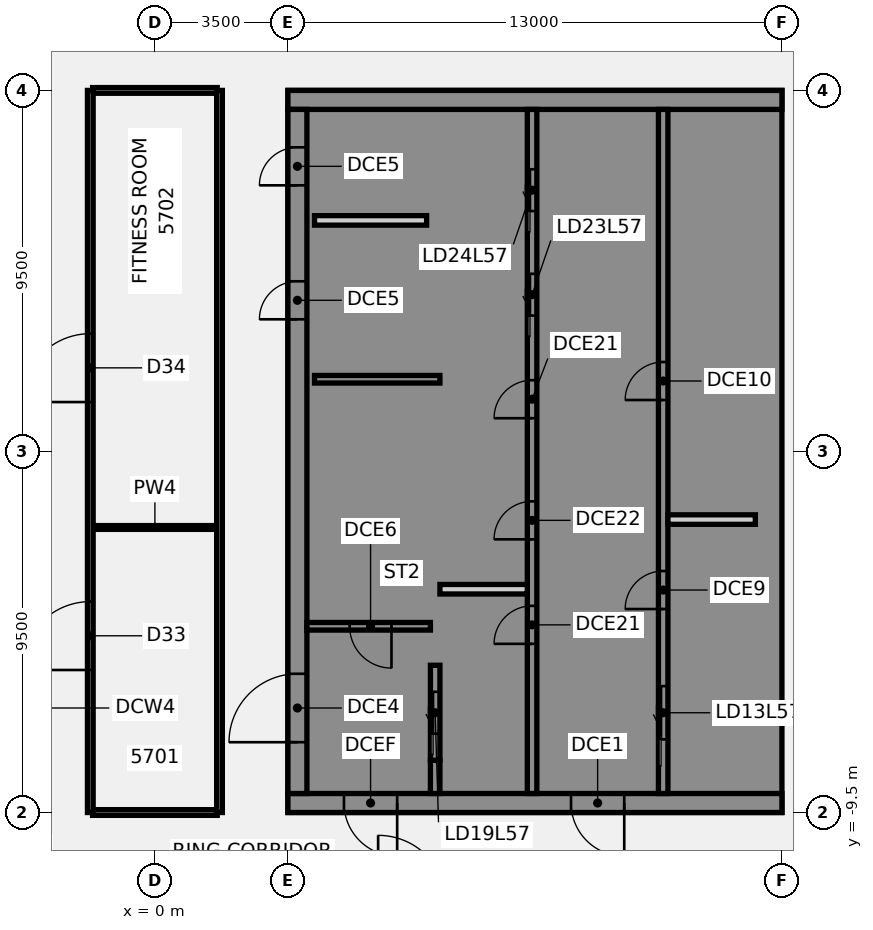
"""IFC4 building model, lengths in metres.
Left out: names, types, materials, properties, quantities, classifications, styles, units other than length and angle.
Written with IfcOpenShell. Run it as: python <this file> out.ifc"""

import sys

from ifc_helpers import new_model, si_unit, direction, frame, frame_2d, origin, place, context, subcontext, project, spatial, polyline, rectangle, outline, extrude, element, fill, save


model = new_model("IFC4")
c1 = context("Model", 3, precision=1e-05, world=origin(), true_north=direction((0.0, 1.0)))
c2 = subcontext(c1, "Body", "Model", "MODEL_VIEW")
j1 = project(units=[si_unit("LENGTHUNIT", "METRE"), si_unit("PLANEANGLEUNIT", "RADIAN")], contexts=[c1])
p1 = place(None, origin())
s1 = spatial("IfcSite", under=j1, at=p1, CompositionType="ELEMENT")
p2 = place(p1, origin())
s2 = spatial("IfcBuilding", under=s1, at=p2, CompositionType="ELEMENT")
p3 = place(p2, frame((0.0, 0.0, 227.1)))
s3 = spatial("IfcBuildingStorey", under=s2, at=p3, CompositionType="ELEMENT", Elevation=227.1)
p4 = place(p3, frame((-1.64, -9.5, 0.0), z_axis=(0.0, 0.0, 1.0), x_axis=(1.0, 0.0, 0.0)))
e1 = element("IfcWall", 1, at=p4, inside=s3, PredefinedType="PARTITIONING", context=c2, shape_type="SweptSolid", body=[
    extrude(rectangle(XDim=3.28, YDim=0.15, at=frame_2d((1.64, 0.0))), origin(), (0.0, 0.0, 1.0), 2.864),
])
p5 = place(p3, frame((-1.64, -2.0, 0.0), z_axis=(0.0, 0.0, 1.0), x_axis=(1.0, 0.0, 0.0)))
e2 = element("IfcWall", 2, at=p5, inside=s3, PredefinedType="PARTITIONING", context=c2, shape_type="SweptSolid", body=[
    extrude(rectangle(XDim=3.28, YDim=0.1, at=frame_2d((1.64, 0.0))), origin(), (0.0, 0.0, 1.0), 2.864),
])
p6 = place(p3, frame((-1.64, 9.5, 0.0), z_axis=(0.0, 0.0, 1.0), x_axis=(1.0, 0.0, 0.0)))
e3 = element("IfcWall", 3, at=p6, inside=s3, PredefinedType="PARTITIONING", context=c2, shape_type="SweptSolid", body=[
    extrude(rectangle(XDim=3.28, YDim=0.15, at=frame_2d((1.64, 0.0))), origin(), (0.0, 0.0, 1.0), 2.864),
])
p7 = place(p3, frame((-1.7, -9.5, 0.0), z_axis=(0.0, 0.0, 1.0), x_axis=(0.0, 1.0, 0.0)))
e4 = element("IfcWall", 4, at=p7, inside=s3, PredefinedType="PARTITIONING", context=c2, shape_type="SweptSolid", body=[
    extrude(rectangle(XDim=19.0, YDim=0.15, at=frame_2d((9.5, 0.0))), origin(), (0.0, 0.0, 1.0), 2.864),
])
p8 = place(p7, frame((3.75, 0.0, 0.0)))
e5 = element("IfcOpeningElement", 5, at=p8, cuts=e4, PredefinedType="OPENING", context=c2, shape_type="SweptSolid", body=[
    extrude(rectangle(XDim=1.8, YDim=2.1, at=frame_2d((0.9, 1.05))), frame((0.0, 0.085, 0.0), z_axis=(0.0, -1.0, 0.0), x_axis=(1.0, 0.0, 0.0)), (0.0, 0.0, 1.0), 0.17),
])
p9 = place(p7, frame((10.8, 0.0, 0.0)))
e6 = element("IfcOpeningElement", 6, at=p9, cuts=e4, PredefinedType="OPENING", context=c2, shape_type="SweptSolid", body=[
    extrude(rectangle(XDim=1.8, YDim=2.1, at=frame_2d((0.9, 1.05))), frame((0.0, 0.085, 0.0), z_axis=(0.0, -1.0, 0.0), x_axis=(1.0, 0.0, 0.0)), (0.0, 0.0, 1.0), 0.17),
])
p10 = place(p3, frame((1.7, -9.5, 0.0), z_axis=(0.0, 0.0, 1.0), x_axis=(0.0, 1.0, 0.0)))
e7 = element("IfcWall", 7, at=p10, inside=s3, PredefinedType="PARTITIONING", context=c2, shape_type="SweptSolid", body=[
    extrude(rectangle(XDim=19.0, YDim=0.15, at=frame_2d((9.5, 0.0))), origin(), (0.0, 0.0, 1.0), 2.864),
])
p11 = place(p3, frame((16.5, -9.25, 0.0), z_axis=(0.0, 0.0, 1.0), x_axis=(-1.0, 0.0, 0.0)))
e8 = element("IfcWall", 8, at=p11, inside=s3, PredefinedType="SHEAR", context=c2, shape_type="SweptSolid", body=[
    extrude(rectangle(XDim=13.0, YDim=0.5, at=frame_2d((6.5, 0.0))), origin(), (0.0, 0.0, 1.0), 3.46),
])
p12 = place(p11, frame((4.15, 0.0, 0.0)))
e9 = element("IfcOpeningElement", 9, at=p12, cuts=e8, PredefinedType="OPENING", context=c2, shape_type="SweptSolid", body=[
    extrude(rectangle(XDim=1.4, YDim=2.1, at=frame_2d((0.7, 1.05))), frame((0.0, 0.26, 0.0), z_axis=(0.0, -1.0, 0.0), x_axis=(1.0, 0.0, 0.0)), (0.0, 0.0, 1.0), 0.52),
])
p13 = place(p11, frame((10.125, 0.0, 0.0)))
e10 = element("IfcOpeningElement", 10, at=p13, cuts=e8, PredefinedType="OPENING", context=c2, shape_type="SweptSolid", body=[
    extrude(rectangle(XDim=1.4, YDim=2.1, at=frame_2d((0.7, 1.05))), frame((0.0, 0.26, 0.0), z_axis=(0.0, -1.0, 0.0), x_axis=(1.0, 0.0, 0.0)), (0.0, 0.0, 1.0), 0.52),
])
p14 = place(p3, origin())
e11 = element("IfcWall", 11, at=p14, inside=s3, PredefinedType="SHEAR", context=c2, shape_type="SweptSolid", body=[
    extrude(outline(polyline([(13.5, -8.125), (13.5, -9.0), (16.0, -9.0), (16.5, -9.0), (16.5, 9.0), (16.0, 9.0), (13.5, 9.0), (13.5, 8.125), (16.0, 8.125), (16.0, 5.625), (13.5, 5.625), (13.5, 5.375), (16.0, 5.375), (16.0, -5.375), (13.5, -5.375), (13.5, -5.625), (16.0, -5.625), (16.0, -8.125), (13.5, -8.125)])), origin(), (0.0, 0.0, 1.0), 3.46),
])
p15 = place(p3, frame((16.5, 9.25, 0.0), z_axis=(0.0, 0.0, 1.0), x_axis=(-1.0, 0.0, 0.0)))
e12 = element("IfcWall", 12, at=p15, inside=s3, PredefinedType="SHEAR", context=c2, shape_type="SweptSolid", body=[
    extrude(rectangle(XDim=13.0, YDim=0.5, at=frame_2d((6.5, 0.0))), origin(), (0.0, 0.0, 1.0), 3.46),
])
p16 = place(p3, origin())
e13 = element("IfcWall", 13, at=p16, inside=s3, PredefinedType="SHEAR", context=c2, shape_type="SweptSolid", body=[
    extrude(outline(polyline([(9.8, -5.375), (7.5, -5.375), (7.5, 2.625), (9.8, 2.625), (9.8, 2.875), (7.5, 2.875), (7.5, 5.375), (9.8, 5.375), (9.8, 5.625), (7.5, 5.625), (7.5, 8.125), (9.8, 8.125), (9.8, 9.0), (7.5, 9.0), (7.25, 9.0), (7.25, -5.625), (7.5, -5.625), (9.8, -5.625), (9.8, -5.375)])), origin(), (0.0, 0.0, 1.0), 3.46),
])
p17 = place(p3, origin())
e14 = element("IfcWall", 14, at=p17, inside=s3, PredefinedType="SHEAR", context=c2, shape_type="SweptSolid", body=[
    extrude(outline(polyline([(7.5, -8.125), (7.5, -9.0), (9.8, -9.0), (9.8, -8.125), (9.8, -5.625), (9.55, -5.625), (9.55, -8.125), (7.5, -8.125)])), origin(), (0.0, 0.0, 1.0), 3.46),
])
p18 = place(p3, frame((7.375, -9.0, 0.0), z_axis=(0.0, 0.0, 1.0), x_axis=(0.0, 1.0, 0.0)))
e15 = element("IfcWall", 15, at=p18, inside=s3, PredefinedType="SHEAR", context=c2, shape_type="SweptSolid", body=[
    extrude(rectangle(XDim=0.875, YDim=0.25, at=frame_2d((0.438, 0.0))), origin(), (0.0, 0.0, 1.0), 3.46),
])
p19 = place(p3, frame((7.5, 1.9, 0.0), z_axis=(0.0, 0.0, 1.0), x_axis=(-1.0, 0.0, 0.0)))
e16 = element("IfcWall", 16, at=p19, inside=s3, PredefinedType="SHEAR", context=c2, shape_type="SweptSolid", body=[
    extrude(rectangle(XDim=3.3, YDim=0.2, at=frame_2d((1.65, 0.0))), origin(), (0.0, 0.0, 1.0), 3.46),
])
p20 = place(p3, frame((13.375, -9.0, 0.0), z_axis=(0.0, 0.0, 1.0), x_axis=(0.0, 1.0, 0.0)))
e17 = element("IfcWall", 17, at=p20, inside=s3, PredefinedType="SHEAR", context=c2, shape_type="SweptSolid", body=[
    extrude(rectangle(XDim=18.0, YDim=0.25, at=frame_2d((9.0, 0.0))), origin(), (0.0, 0.0, 1.0), 3.46),
])
p21 = place(p20, frame((1.425, 0.0, 0.0)))
e18 = element("IfcOpeningElement", 18, at=p21, cuts=e17, PredefinedType="OPENING", context=c2, shape_type="SweptSolid", body=[
    extrude(rectangle(XDim=1.4, YDim=2.1, at=frame_2d((0.7, 1.05))), frame((0.0, 0.135, 0.0), z_axis=(0.0, -1.0, 0.0), x_axis=(1.0, 0.0, 0.0)), (0.0, 0.0, 1.0), 0.27),
])
p22 = place(p20, frame((4.854, 0.0, 0.0)))
e19 = element("IfcOpeningElement", 19, at=p22, cuts=e17, PredefinedType="OPENING", context=c2, shape_type="SweptSolid", body=[
    extrude(rectangle(XDim=1.0, YDim=2.1, at=frame_2d((0.5, 1.05))), frame((0.0, 0.135, 0.0), z_axis=(0.0, -1.0, 0.0), x_axis=(1.0, 0.0, 0.0)), (0.0, 0.0, 1.0), 0.27),
])
p23 = place(p20, frame((10.354, 0.0, 0.0)))
e20 = element("IfcOpeningElement", 20, at=p23, cuts=e17, PredefinedType="OPENING", context=c2, shape_type="SweptSolid", body=[
    extrude(rectangle(XDim=1.0, YDim=2.1, at=frame_2d((0.5, 1.05))), frame((0.0, 0.135, 0.0), z_axis=(0.0, -1.0, 0.0), x_axis=(1.0, 0.0, 0.0)), (0.0, 0.0, 1.0), 0.27),
])
p24 = place(p3, frame((9.925, -9.0, 0.0), z_axis=(0.0, 0.0, 1.0), x_axis=(0.0, 1.0, 0.0)))
e21 = element("IfcWall", 21, at=p24, inside=s3, PredefinedType="SHEAR", context=c2, shape_type="SweptSolid", body=[
    extrude(rectangle(XDim=18.0, YDim=0.25, at=frame_2d((9.0, 0.0))), origin(), (0.0, 0.0, 1.0), 3.46),
])
p25 = place(p24, frame((12.575, 0.0, 0.0)))
e22 = element("IfcOpeningElement", 22, at=p25, cuts=e21, PredefinedType="OPENING", context=c2, shape_type="SweptSolid", body=[
    extrude(rectangle(XDim=1.1, YDim=2.1, at=frame_2d((0.55, 1.05))), frame((0.0, 0.135, 0.0), z_axis=(0.0, -1.0, 0.0), x_axis=(1.0, 0.0, 0.0)), (0.0, 0.0, 1.0), 0.27),
])
p26 = place(p24, frame((15.325, 0.0, 0.0)))
e23 = element("IfcOpeningElement", 23, at=p26, cuts=e21, PredefinedType="OPENING", context=c2, shape_type="SweptSolid", body=[
    extrude(rectangle(XDim=1.1, YDim=2.1, at=frame_2d((0.55, 1.05))), frame((0.0, 0.135, 0.0), z_axis=(0.0, -1.0, 0.0), x_axis=(1.0, 0.0, 0.0)), (0.0, 0.0, 1.0), 0.27),
])
p27 = place(p24, frame((3.938, 0.0, 0.0)))
e24 = element("IfcOpeningElement", 24, at=p27, cuts=e21, PredefinedType="OPENING", context=c2, shape_type="SweptSolid", body=[
    extrude(rectangle(XDim=1.0, YDim=2.1, at=frame_2d((0.5, 1.05))), frame((0.0, 0.135, 0.0), z_axis=(0.0, -1.0, 0.0), x_axis=(1.0, 0.0, 0.0)), (0.0, 0.0, 1.0), 0.27),
])
p28 = place(p24, frame((6.688, 0.0, 0.0)))
e25 = element("IfcOpeningElement", 25, at=p28, cuts=e21, PredefinedType="OPENING", context=c2, shape_type="SweptSolid", body=[
    extrude(rectangle(XDim=1.0, YDim=2.1, at=frame_2d((0.5, 1.05))), frame((0.0, 0.135, 0.0), z_axis=(0.0, -1.0, 0.0), x_axis=(1.0, 0.0, 0.0)), (0.0, 0.0, 1.0), 0.27),
])
p29 = place(p24, frame((9.875, 0.0, 0.0)))
e26 = element("IfcOpeningElement", 26, at=p29, cuts=e21, PredefinedType="OPENING", context=c2, shape_type="SweptSolid", body=[
    extrude(rectangle(XDim=1.0, YDim=2.1, at=frame_2d((0.5, 1.05))), frame((0.0, 0.135, 0.0), z_axis=(0.0, -1.0, 0.0), x_axis=(1.0, 0.0, 0.0)), (0.0, 0.0, 1.0), 0.27),
])
p30 = place(p3, frame((7.375, -8.125, 0.0), z_axis=(0.0, 0.0, 1.0), x_axis=(0.0, 1.0, 0.0)))
e27 = element("IfcWall", 27, at=p30, inside=s3, PredefinedType="SHEAR", context=c2, shape_type="SweptSolid", body=[
    extrude(rectangle(XDim=2.5, YDim=0.25, at=frame_2d((1.25, 0.0))), origin(), (0.0, 0.0, 1.0), 3.46),
])
p31 = place(p30, frame((0.7, 0.0, 0.0)))
e28 = element("IfcOpeningElement", 28, at=p31, cuts=e27, PredefinedType="OPENING", context=c2, shape_type="SweptSolid", body=[
    extrude(rectangle(XDim=1.1, YDim=2.1, at=frame_2d((0.55, 1.05))), frame((0.0, 0.135, 0.0), z_axis=(0.0, -1.0, 0.0), x_axis=(1.0, 0.0, 0.0)), (0.0, 0.0, 1.0), 0.27),
])
p32 = place(p3, frame((3.75, -9.0, 0.0), z_axis=(0.0, 0.0, 1.0), x_axis=(0.0, 1.0, 0.0)))
e29 = element("IfcWall", 29, at=p32, inside=s3, PredefinedType="SHEAR", context=c2, shape_type="SweptSolid", body=[
    extrude(rectangle(XDim=18.0, YDim=0.5, at=frame_2d((9.0, 0.0))), origin(), (0.0, 0.0, 1.0), 3.46),
])
p33 = place(p32, frame((1.35, 0.0, 0.0)))
e30 = element("IfcOpeningElement", 30, at=p33, cuts=e29, PredefinedType="OPENING", context=c2, shape_type="SweptSolid", body=[
    extrude(rectangle(XDim=1.8, YDim=2.1, at=frame_2d((0.9, 1.05))), frame((0.0, 0.26, 0.0), z_axis=(0.0, -1.0, 0.0), x_axis=(1.0, 0.0, 0.0)), (0.0, 0.0, 1.0), 0.52),
])
p34 = place(p32, frame((12.478, 0.0, 0.0)))
e31 = element("IfcOpeningElement", 31, at=p34, cuts=e29, PredefinedType="OPENING", context=c2, shape_type="SweptSolid", body=[
    extrude(rectangle(XDim=1.0, YDim=2.1, at=frame_2d((0.5, 1.05))), frame((0.0, 0.26, 0.0), z_axis=(0.0, -1.0, 0.0), x_axis=(1.0, 0.0, 0.0)), (0.0, 0.0, 1.0), 0.52),
])
p35 = place(p32, frame((16.002, 0.0, 0.0)))
e32 = element("IfcOpeningElement", 32, at=p35, cuts=e29, PredefinedType="OPENING", context=c2, shape_type="SweptSolid", body=[
    extrude(rectangle(XDim=1.0, YDim=2.1, at=frame_2d((0.5, 1.05))), frame((0.0, 0.26, 0.0), z_axis=(0.0, -1.0, 0.0), x_axis=(1.0, 0.0, 0.0)), (0.0, 0.0, 1.0), 0.52),
])
p36 = place(p3, frame((7.15, 6.08, 0.0), z_axis=(0.0, 0.0, 1.0), x_axis=(-1.0, 0.0, 0.0)))
e33 = element("IfcWall", 33, at=p36, inside=s3, PredefinedType="PARTITIONING", context=c2, shape_type="SweptSolid", body=[
    extrude(rectangle(XDim=2.95, YDim=0.25, at=frame_2d((1.475, 0.0))), origin(), (0.0, 0.0, 1.0), 3.46),
])
p37 = place(p3, frame((7.25, -4.6, 0.0), z_axis=(0.0, 0.0, 1.0), x_axis=(-1.0, 0.0, 0.0)))
e34 = element("IfcWall", 34, at=p37, inside=s3, PredefinedType="SHEAR", context=c2, shape_type="SweptSolid", body=[
    extrude(rectangle(XDim=3.25, YDim=0.2, at=frame_2d((1.625, 0.0))), origin(), (0.0, 0.0, 1.0), 3.46),
])
p38 = place(p37, frame((1.025, 0.0, 0.0)))
e35 = element("IfcOpeningElement", 35, at=p38, cuts=e34, PredefinedType="OPENING", context=c2, shape_type="SweptSolid", body=[
    extrude(rectangle(XDim=1.1, YDim=2.1, at=frame_2d((0.55, 1.05))), frame((0.0, 0.11, 0.0), z_axis=(0.0, -1.0, 0.0), x_axis=(1.0, 0.0, 0.0)), (0.0, 0.0, 1.0), 0.22),
])
for number, where, z_axis, x_axis in (
    (36, (15.8, -1.792, 0.0), (0.0, 0.0, 1.0), (-1.0, 0.0, 0.0)),
    (37, (9.8, -3.625, 0.0), (0.0, 0.0, 1.0), (-1.0, 0.0, 0.0)),
):
    element("IfcWall", number, at=place(p3, frame(where, z_axis=z_axis, x_axis=x_axis)), inside=s3, PredefinedType="PARTITIONING", context=c2, shape_type="SweptSolid", body=[
        extrude(rectangle(XDim=2.3, YDim=0.25, at=frame_2d((1.15, 0.0))), origin(), (0.0, 0.0, 1.0), 3.46),
    ])
p39 = place(p8, frame((1.8, 0.0, 0.0), z_axis=(0.0, 0.0, 1.0), x_axis=(-1.0, 0.0, 0.0)))
e38 = element("IfcDoor", 38, at=p39, inside=s3, OperationType="DOUBLE_DOOR_SINGLE_SWING", PredefinedType="DOOR", context=c2, shape_type="SweptSolid", body=[
    extrude(rectangle(XDim=1.8, YDim=2.1, at=frame_2d((0.9, 1.05))), frame((0.0, 0.025, 0.0), z_axis=(0.0, -1.0, 0.0), x_axis=(1.0, 0.0, 0.0)), (0.0, 0.0, 1.0), 0.05),
])
fill(e5, e38)
p40 = place(p9, frame((1.8, 0.0, 0.0), z_axis=(0.0, 0.0, 1.0), x_axis=(-1.0, 0.0, 0.0)))
e39 = element("IfcDoor", 39, at=p40, inside=s3, OperationType="DOUBLE_DOOR_SINGLE_SWING", PredefinedType="DOOR", context=c2, shape_type="SweptSolid", body=[
    extrude(rectangle(XDim=1.8, YDim=2.1, at=frame_2d((0.9, 1.05))), frame((0.0, 0.025, 0.0), z_axis=(0.0, -1.0, 0.0), x_axis=(1.0, 0.0, 0.0)), (0.0, 0.0, 1.0), 0.05),
])
fill(e6, e39)
p41 = place(p12, origin())
e40 = element("IfcDoor", 40, at=p41, inside=s3, OperationType="SINGLE_SWING_LEFT", PredefinedType="DOOR", context=c2, shape_type="SweptSolid", body=[
    extrude(rectangle(XDim=1.4, YDim=2.1, at=frame_2d((0.7, 1.05))), frame((0.0, 0.025, 0.0), z_axis=(0.0, -1.0, 0.0), x_axis=(1.0, 0.0, 0.0)), (0.0, 0.0, 1.0), 0.05),
])
fill(e9, e40)
p42 = place(p13, origin())
e41 = element("IfcDoor", 41, at=p42, inside=s3, OperationType="SINGLE_SWING_LEFT", PredefinedType="DOOR", context=c2, shape_type="SweptSolid", body=[
    extrude(rectangle(XDim=1.4, YDim=2.1, at=frame_2d((0.7, 1.05))), frame((0.0, 0.025, 0.0), z_axis=(0.0, -1.0, 0.0), x_axis=(1.0, 0.0, 0.0)), (0.0, 0.0, 1.0), 0.05),
])
fill(e10, e41)
p43 = place(p33, origin())
e42 = element("IfcDoor", 42, at=p43, inside=s3, OperationType="SINGLE_SWING_LEFT", PredefinedType="DOOR", context=c2, shape_type="SweptSolid", body=[
    extrude(rectangle(XDim=1.8, YDim=2.1, at=frame_2d((0.9, 1.05))), frame((0.0, 0.025, 0.0), z_axis=(0.0, -1.0, 0.0), x_axis=(1.0, 0.0, 0.0)), (0.0, 0.0, 1.0), 0.05),
])
fill(e30, e42)
p44 = place(p34, origin())
e43 = element("IfcDoor", 43, at=p44, inside=s3, OperationType="SINGLE_SWING_LEFT", PredefinedType="DOOR", context=c2, shape_type="SweptSolid", body=[
    extrude(rectangle(XDim=1.0, YDim=2.1, at=frame_2d((0.5, 1.05))), frame((0.0, -0.175, 0.0), z_axis=(0.0, -1.0, 0.0), x_axis=(1.0, 0.0, 0.0)), (0.0, 0.0, 1.0), 0.05),
])
fill(e31, e43)
p45 = place(p35, origin())
e44 = element("IfcDoor", 44, at=p45, inside=s3, OperationType="SINGLE_SWING_LEFT", PredefinedType="DOOR", context=c2, shape_type="SweptSolid", body=[
    extrude(rectangle(XDim=1.0, YDim=2.1, at=frame_2d((0.5, 1.05))), frame((0.0, -0.175, 0.0), z_axis=(0.0, -1.0, 0.0), x_axis=(1.0, 0.0, 0.0)), (0.0, 0.0, 1.0), 0.05),
])
fill(e32, e44)
p46 = place(p38, origin())
e45 = element("IfcDoor", 45, at=p46, inside=s3, OperationType="SINGLE_SWING_LEFT", PredefinedType="DOOR", context=c2, shape_type="SweptSolid", body=[
    extrude(rectangle(XDim=1.1, YDim=2.1, at=frame_2d((0.55, 1.05))), frame((0.0, 0.025, 0.0), z_axis=(0.0, -1.0, 0.0), x_axis=(1.0, 0.0, 0.0)), (0.0, 0.0, 1.0), 0.05),
])
fill(e35, e45)
p47 = place(p21, origin())
e46 = element("IfcDoor", 46, at=p47, inside=s3, OperationType="SLIDING_TO_LEFT", PredefinedType="DOOR", context=c2, shape_type="SweptSolid", body=[
    extrude(rectangle(XDim=1.4, YDim=2.1, at=frame_2d((0.7, 1.05))), frame((0.0, 0.025, 0.0), z_axis=(0.0, -1.0, 0.0), x_axis=(1.0, 0.0, 0.0)), (0.0, 0.0, 1.0), 0.05),
])
fill(e18, e46)
p48 = place(p31, origin())
e47 = element("IfcDoor", 47, at=p48, inside=s3, OperationType="SLIDING_TO_LEFT", PredefinedType="DOOR", context=c2, shape_type="SweptSolid", body=[
    extrude(rectangle(XDim=1.1, YDim=2.1, at=frame_2d((0.55, 1.05))), frame((0.0, 0.025, 0.0), z_axis=(0.0, -1.0, 0.0), x_axis=(1.0, 0.0, 0.0)), (0.0, 0.0, 1.0), 0.05),
])
fill(e28, e47)
p49 = place(p25, origin())
e48 = element("IfcDoor", 48, at=p49, inside=s3, OperationType="SLIDING_TO_LEFT", PredefinedType="DOOR", context=c2, shape_type="SweptSolid", body=[
    extrude(rectangle(XDim=1.1, YDim=2.1, at=frame_2d((0.55, 1.05))), frame((0.0, 0.025, 0.0), z_axis=(0.0, -1.0, 0.0), x_axis=(1.0, 0.0, 0.0)), (0.0, 0.0, 1.0), 0.05),
])
fill(e22, e48)
p50 = place(p26, origin())
e49 = element("IfcDoor", 49, at=p50, inside=s3, OperationType="SLIDING_TO_LEFT", PredefinedType="DOOR", context=c2, shape_type="SweptSolid", body=[
    extrude(rectangle(XDim=1.1, YDim=2.1, at=frame_2d((0.55, 1.05))), frame((0.0, 0.025, 0.0), z_axis=(0.0, -1.0, 0.0), x_axis=(1.0, 0.0, 0.0)), (0.0, 0.0, 1.0), 0.05),
])
fill(e23, e49)
p51 = place(p22, origin())
e50 = element("IfcDoor", 50, at=p51, inside=s3, OperationType="SINGLE_SWING_LEFT", PredefinedType="DOOR", context=c2, shape_type="SweptSolid", body=[
    extrude(rectangle(XDim=1.0, YDim=2.1, at=frame_2d((0.5, 1.05))), frame((0.0, 0.025, 0.0), z_axis=(0.0, -1.0, 0.0), x_axis=(1.0, 0.0, 0.0)), (0.0, 0.0, 1.0), 0.05),
])
fill(e19, e50)
p52 = place(p23, origin())
e51 = element("IfcDoor", 51, at=p52, inside=s3, OperationType="SINGLE_SWING_LEFT", PredefinedType="DOOR", context=c2, shape_type="SweptSolid", body=[
    extrude(rectangle(XDim=1.0, YDim=2.1, at=frame_2d((0.5, 1.05))), frame((0.0, 0.025, 0.0), z_axis=(0.0, -1.0, 0.0), x_axis=(1.0, 0.0, 0.0)), (0.0, 0.0, 1.0), 0.05),
])
fill(e20, e51)
p53 = place(p27, origin())
e52 = element("IfcDoor", 52, at=p53, inside=s3, OperationType="SINGLE_SWING_LEFT", PredefinedType="DOOR", context=c2, shape_type="SweptSolid", body=[
    extrude(rectangle(XDim=1.0, YDim=2.1, at=frame_2d((0.5, 1.05))), frame((0.0, 0.025, 0.0), z_axis=(0.0, -1.0, 0.0), x_axis=(1.0, 0.0, 0.0)), (0.0, 0.0, 1.0), 0.05),
])
fill(e24, e52)
p54 = place(p28, origin())
e53 = element("IfcDoor", 53, at=p54, inside=s3, OperationType="SINGLE_SWING_LEFT", PredefinedType="DOOR", context=c2, shape_type="SweptSolid", body=[
    extrude(rectangle(XDim=1.0, YDim=2.1, at=frame_2d((0.5, 1.05))), frame((0.0, 0.025, 0.0), z_axis=(0.0, -1.0, 0.0), x_axis=(1.0, 0.0, 0.0)), (0.0, 0.0, 1.0), 0.05),
])
fill(e25, e53)
p55 = place(p29, origin())
e54 = element("IfcDoor", 54, at=p55, inside=s3, OperationType="SINGLE_SWING_LEFT", PredefinedType="DOOR", context=c2, shape_type="SweptSolid", body=[
    extrude(rectangle(XDim=1.0, YDim=2.1, at=frame_2d((0.5, 1.05))), frame((0.0, 0.025, 0.0), z_axis=(0.0, -1.0, 0.0), x_axis=(1.0, 0.0, 0.0)), (0.0, 0.0, 1.0), 0.05),
])
fill(e26, e54)
save(model, sys.argv[1])
